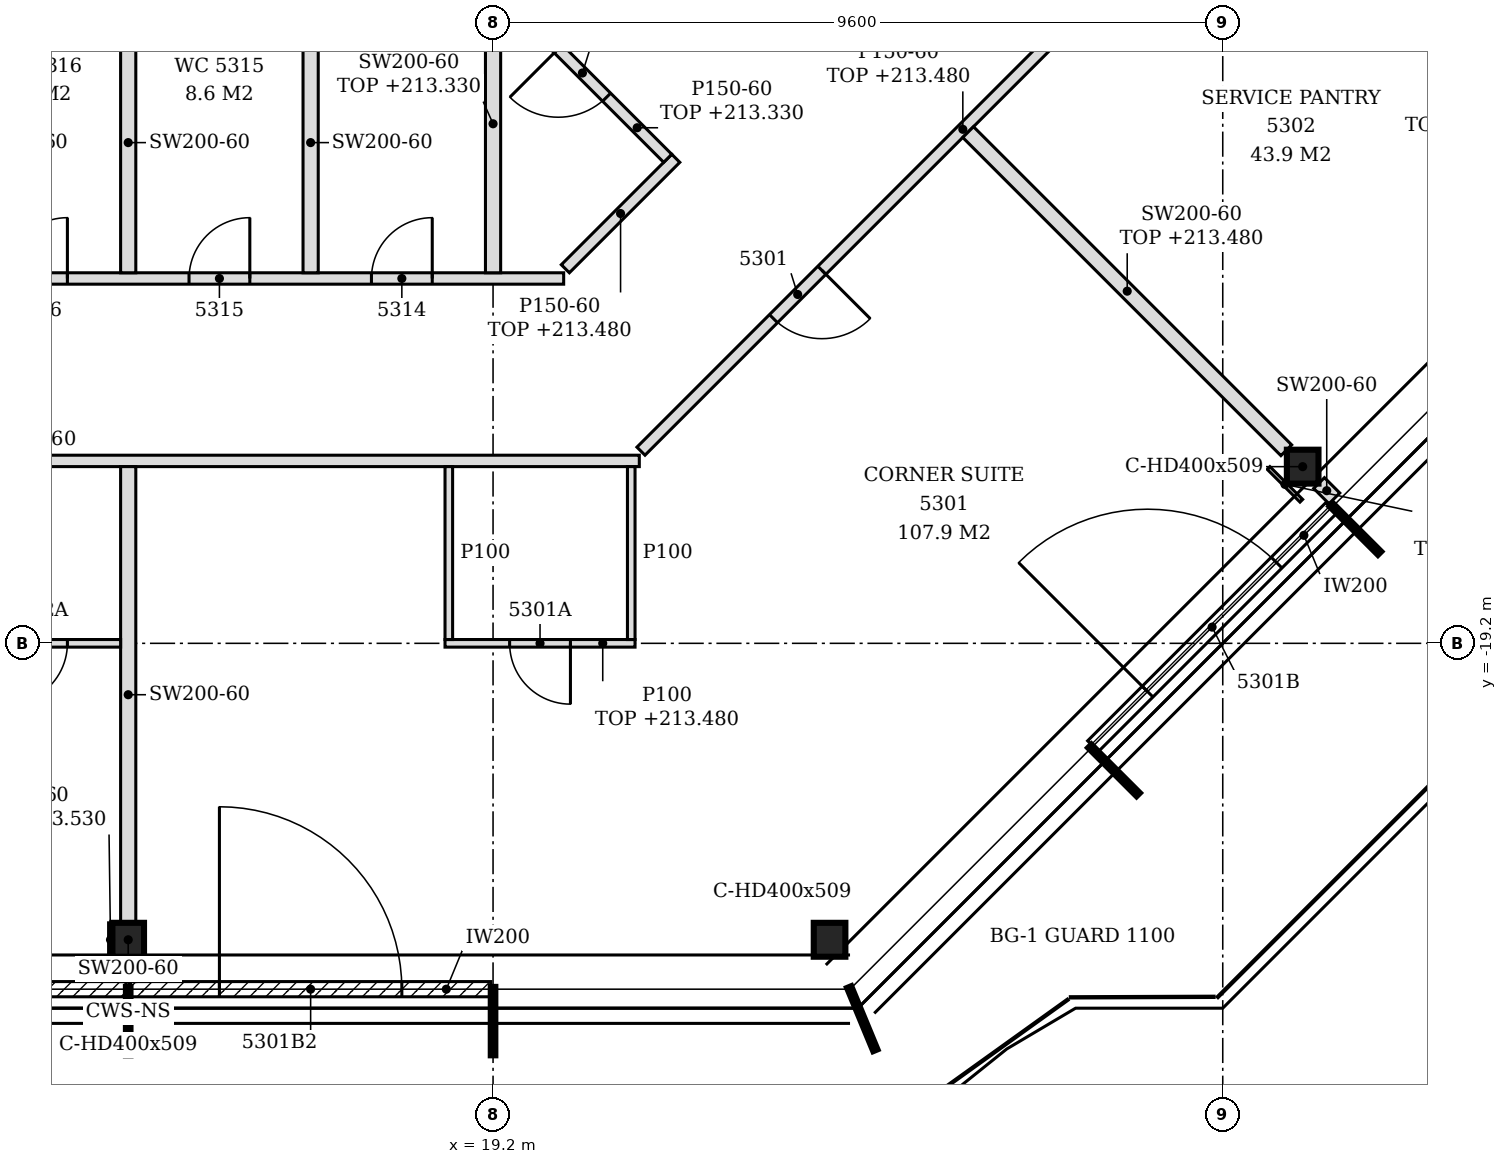
"""IFC4 building model, lengths in metres.
Left out: names, types, materials, properties, quantities, classifications, styles, units other than length and angle.
Written with IfcOpenShell. Run it as: python <this file> out.ifc"""

import sys

from ifc_helpers import new_model, si_unit, direction, frame, frame_2d, origin, origin_2d, place, context, subcontext, project, spatial, polyline, rectangle, i_section, outline, extrude, element, fill, save


model = new_model("IFC4")
c1 = context("Model", 3, precision=1e-05, world=origin(), true_north=direction((0.0, 1.0)))
c2 = subcontext(c1, "Body", "Model", "MODEL_VIEW")
j1 = project(units=[si_unit("LENGTHUNIT", "METRE"), si_unit("PLANEANGLEUNIT", "RADIAN")], contexts=[c1])
p1 = place(None, origin())
s1 = spatial("IfcSite", under=j1, at=p1, CompositionType="ELEMENT")
p2 = place(p1, origin())
s2 = spatial("IfcBuilding", under=s1, at=p2, CompositionType="ELEMENT")
p3 = place(p2, frame((0.0, 0.0, 210.6)))
s3 = spatial("IfcBuildingStorey", under=s2, at=p3, CompositionType="ELEMENT", Elevation=210.6)
for number, where, z_axis, x_axis in (
    (1, (14.4, -23.1, -0.15), (0.0, 0.0, 1.0), (1.0, 0.0, 0.0)),
    (2, (23.627, -23.1, -0.15), (0.0, 0.0, 1.0), (1.0, 0.0, 0.0)),
    (3, (29.852, -16.876, -0.15), (0.0, 0.0, 1.0), (1.0, 0.0, 0.0)),
):
    element("IfcColumn", number, at=place(p3, frame(where, z_axis=z_axis, x_axis=x_axis)), inside=s3, PredefinedType="COLUMN", context=c2, shape_type="SweptSolid", body=[
        extrude(i_section(OverallWidth=0.416, OverallDepth=0.446, WebThickness=0.039, FlangeThickness=0.063, FilletRadius=0.015, at=origin_2d()), origin(), (0.0, 0.0, 1.0), 3.6),
    ])
p4 = place(p3, frame((9.63, -23.75, 0.0), z_axis=(0.0, 0.0, 1.0), x_axis=(1.0, 0.0, 0.0)))
e4 = element("IfcWall", 4, at=p4, inside=s3, PredefinedType="NOTDEFINED", context=c2, shape_type="SweptSolid", body=[
    extrude(rectangle(XDim=4.74, YDim=0.2, at=frame_2d((2.37, 0.0))), origin(), (0.0, 0.0, 1.0), 3.45),
])
p5 = place(p4, frame((1.17, 0.0, 0.0)))
e5 = element("IfcOpeningElement", 5, at=p5, cuts=e4, PredefinedType="OPENING", context=c2, shape_type="SweptSolid", body=[
    extrude(rectangle(XDim=2.4, YDim=2.4, at=frame_2d((1.2, 1.2))), frame((0.0, 0.11, 0.0), z_axis=(0.0, -1.0, 0.0), x_axis=(1.0, 0.0, 0.0)), (0.0, 0.0, 1.0), 0.22),
])
p6 = place(p3, frame((14.43, -23.75, 0.0), z_axis=(0.0, 0.0, 1.0), x_axis=(1.0, 0.0, 0.0)))
e6 = element("IfcWall", 6, at=p6, inside=s3, PredefinedType="NOTDEFINED", context=c2, shape_type="SweptSolid", body=[
    extrude(rectangle(XDim=4.74, YDim=0.2, at=frame_2d((2.37, 0.0))), origin(), (0.0, 0.0, 1.0), 3.45),
])
p7 = place(p6, frame((1.17, 0.0, 0.0)))
e7 = element("IfcOpeningElement", 7, at=p7, cuts=e6, PredefinedType="OPENING", context=c2, shape_type="SweptSolid", body=[
    extrude(rectangle(XDim=2.4, YDim=2.4, at=frame_2d((1.2, 1.2))), frame((0.0, 0.11, 0.0), z_axis=(0.0, -1.0, 0.0), x_axis=(1.0, 0.0, 0.0)), (0.0, 0.0, 1.0), 0.22),
])
p8 = place(p3, frame((27.093, -20.553, 0.0), z_axis=(0.0, 0.0, 1.0), x_axis=(0.707079231393, 0.707134329907, 0.0)))
e8 = element("IfcWall", 8, at=p8, inside=s3, PredefinedType="NOTDEFINED", context=c2, shape_type="SweptSolid", body=[
    extrude(rectangle(XDim=4.431, YDim=0.2, at=frame_2d((2.215, 0.0))), origin(), (0.0, 0.0, 1.0), 3.45),
])
p9 = place(p8, frame((1.015, 0.0, 0.0)))
e9 = element("IfcOpeningElement", 9, at=p9, cuts=e8, PredefinedType="OPENING", context=c2, shape_type="SweptSolid", body=[
    extrude(rectangle(XDim=2.4, YDim=2.4, at=frame_2d((1.2, 1.2))), frame((0.0, 0.11, 0.0), z_axis=(0.0, -1.0, 0.0), x_axis=(1.0, 0.0, 0.0)), (0.0, 0.0, 1.0), 0.22),
])
p10 = place(p3, frame((14.4, -23.65, 0.0), z_axis=(0.0, 0.0, 1.0), x_axis=(0.0, 1.0, 0.0)))
e10 = element("IfcWall", 10, at=p10, inside=s3, PredefinedType="PARTITIONING", context=c2, shape_type="SweptSolid", body=[
    extrude(rectangle(XDim=0.327, YDim=0.2, at=frame_2d((0.164, 0.0))), origin(), (0.0, 0.0, 1.0), 3.45),
])
p11 = place(p3, frame((14.4, -22.877, 0.0), z_axis=(0.0, 0.0, 1.0), x_axis=(0.0, 1.0, 0.0)))
e11 = element("IfcWall", 11, at=p11, inside=s3, PredefinedType="PARTITIONING", context=c2, shape_type="SweptSolid", body=[
    extrude(outline(polyline([(0.0, 0.0), (6.002, 0.0), (6.002, 3.45), (3.782, 3.45), (3.78, 2.88), (3.572, 2.88), (3.57, 3.45), (0.0, 3.45), (0.0, 0.0)])), frame((0.0, 0.1, 0.0), z_axis=(0.0, -1.0, 0.0), x_axis=(1.0, 0.0, 0.0)), (0.0, 0.0, 1.0), 0.2),
])
p12 = place(p3, frame((11.95, -19.2, 0.0), z_axis=(0.0, 0.0, 1.0), x_axis=(1.0, 0.0, 0.0)))
e12 = element("IfcWall", 12, at=p12, inside=s3, PredefinedType="PARTITIONING", context=c2, shape_type="SweptSolid", body=[
    extrude(rectangle(XDim=2.35, YDim=0.1, at=frame_2d((1.175, 0.0))), origin(), (0.0, 0.0, 1.0), 2.88),
])
p13 = place(p12, frame((0.85, 0.0, 0.0)))
e13 = element("IfcOpeningElement", 13, at=p13, cuts=e12, PredefinedType="OPENING", context=c2, shape_type="SweptSolid", body=[
    extrude(rectangle(XDim=0.8, YDim=2.1, at=frame_2d((0.4, 1.05))), frame((0.0, 0.06, 0.0), z_axis=(0.0, -1.0, 0.0), x_axis=(1.0, 0.0, 0.0)), (0.0, 0.0, 1.0), 0.12),
])
p14 = place(p3, frame((18.568, -19.2, 0.0), z_axis=(0.0, 0.0, 1.0), x_axis=(1.0, 0.0, 0.0)))
e14 = element("IfcWall", 14, at=p14, inside=s3, PredefinedType="PARTITIONING", context=c2, shape_type="SweptSolid", body=[
    extrude(outline(polyline([(0.0, 0.0), (2.5, 0.0), (2.5, 2.88), (0.782, 2.88), (0.78, 2.73), (0.482, 2.73), (0.48, 2.88), (0.0, 2.88), (0.0, 0.0)])), frame((0.0, 0.05, 0.0), z_axis=(0.0, -1.0, 0.0), x_axis=(1.0, 0.0, 0.0)), (0.0, 0.0, 1.0), 0.1),
])
p15 = place(p14, frame((0.85, 0.0, 0.0)))
e15 = element("IfcOpeningElement", 15, at=p15, cuts=e14, PredefinedType="OPENING", context=c2, shape_type="SweptSolid", body=[
    extrude(rectangle(XDim=0.8, YDim=2.1, at=frame_2d((0.4, 1.05))), frame((0.0, 0.06, 0.0), z_axis=(0.0, -1.0, 0.0), x_axis=(1.0, 0.0, 0.0)), (0.0, 0.0, 1.0), 0.12),
])
p16 = place(p3, frame((18.618, -19.15, 0.0), z_axis=(0.0, 0.0, 1.0), x_axis=(0.0, 1.0, 0.0)))
e16 = element("IfcWall", 16, at=p16, inside=s3, PredefinedType="PARTITIONING", context=c2, shape_type="SweptSolid", body=[
    extrude(outline(polyline([(0.0, 0.0), (2.275, 0.0), (2.275, 3.45), (0.055, 3.45), (0.053, 2.88), (0.0, 2.88), (0.0, 0.0)])), frame((0.0, 0.05, 0.0), z_axis=(0.0, -1.0, 0.0), x_axis=(1.0, 0.0, 0.0)), (0.0, 0.0, 1.0), 0.1),
])
p17 = place(p3, frame((21.018, -19.15, 0.0), z_axis=(0.0, 0.0, 1.0), x_axis=(0.0, 1.0, 0.0)))
e17 = element("IfcWall", 17, at=p17, inside=s3, PredefinedType="PARTITIONING", context=c2, shape_type="SweptSolid", body=[
    extrude(outline(polyline([(0.0, 0.0), (2.275, 0.0), (2.275, 3.45), (0.045, 3.45), (0.043, 2.98), (0.0, 2.98), (0.0, 0.0)])), frame((0.0, 0.05, 0.0), z_axis=(0.0, -1.0, 0.0), x_axis=(1.0, 0.0, 0.0)), (0.0, 0.0, 1.0), 0.1),
])
p18 = place(p3, frame((30.269, -17.293, 0.0), z_axis=(0.0, 0.0, 1.0), x_axis=(-0.707106781187, 0.707106781187, 0.0)))
e18 = element("IfcWall", 18, at=p18, inside=s3, PredefinedType="PARTITIONING", context=c2, shape_type="SweptSolid", body=[
    extrude(rectangle(XDim=0.285, YDim=0.2, at=frame_2d((0.143, 0.0))), origin(), (0.0, 0.0, 1.0), 3.45),
])
p19 = place(p3, frame((-0.844, -16.8, 0.0), z_axis=(0.0, 0.0, 1.0), x_axis=(1.0, 0.0, 0.0)))
e19 = element("IfcWall", 19, at=p19, inside=s3, PredefinedType="PARTITIONING", context=c2, shape_type="SweptSolid", body=[
    extrude(outline(polyline([(0.0, 0.0), (21.968, 0.0), (21.968, 3.45), (20.194, 3.45), (20.191, 2.73), (19.894, 2.73), (19.892, 3.45), (8.194, 3.45), (8.191, 2.73), (7.894, 2.73), (7.892, 3.45), (0.0, 3.45), (0.0, 0.0)])), frame((0.0, 0.075, 0.0), z_axis=(0.0, -1.0, 0.0), x_axis=(1.0, 0.0, 0.0)), (0.0, 0.0, 1.0), 0.15),
])
p20 = place(p19, frame((5.194, 0.0, 0.0)))
e20 = element("IfcOpeningElement", 20, at=p20, cuts=e19, PredefinedType="OPENING", context=c2, shape_type="SweptSolid", body=[
    extrude(rectangle(XDim=0.9, YDim=2.1, at=frame_2d((0.45, 1.05))), frame((0.0, 0.085, 0.0), z_axis=(0.0, -1.0, 0.0), x_axis=(1.0, 0.0, 0.0)), (0.0, 0.0, 1.0), 0.17),
])
p21 = place(p3, frame((21.146, -16.672, 0.0), z_axis=(0.0, 0.0, 1.0), x_axis=(0.707100999376, 0.70711256295, 0.0)))
e21 = element("IfcWall", 21, at=p21, inside=s3, PredefinedType="PARTITIONING", context=c2, shape_type="SweptSolid", body=[
    extrude(rectangle(XDim=21.113, YDim=0.15, at=frame_2d((10.556, 0.0))), origin(), (0.0, 0.0, 1.0), 2.88),
])
p22 = place(p21, frame((2.466, 0.0, 0.0)))
e22 = element("IfcOpeningElement", 22, at=p22, cuts=e21, PredefinedType="OPENING", context=c2, shape_type="SweptSolid", body=[
    extrude(rectangle(XDim=0.9, YDim=2.1, at=frame_2d((0.45, 1.05))), frame((0.0, 0.085, 0.0), z_axis=(0.0, -1.0, 0.0), x_axis=(1.0, 0.0, 0.0)), (0.0, 0.0, 1.0), 0.17),
])
p23 = place(p21, frame((8.611, 0.0, 0.0)))
e23 = element("IfcOpeningElement", 23, at=p23, cuts=e21, PredefinedType="OPENING", context=c2, shape_type="SweptSolid", body=[
    extrude(rectangle(XDim=0.9, YDim=2.1, at=frame_2d((0.45, 1.05))), frame((0.0, 0.085, 0.0), z_axis=(0.0, -1.0, 0.0), x_axis=(1.0, 0.0, 0.0)), (0.0, 0.0, 1.0), 0.17),
])
p24 = place(p21, frame((13.012, 0.0, 0.0)))
e24 = element("IfcOpeningElement", 24, at=p24, cuts=e21, PredefinedType="OPENING", context=c2, shape_type="SweptSolid", body=[
    extrude(rectangle(XDim=0.9, YDim=2.1, at=frame_2d((0.45, 1.05))), frame((0.0, 0.085, 0.0), z_axis=(0.0, -1.0, 0.0), x_axis=(1.0, 0.0, 0.0)), (0.0, 0.0, 1.0), 0.17),
])
p25 = place(p21, frame((16.261, 0.0, 0.0)))
e25 = element("IfcOpeningElement", 25, at=p25, cuts=e21, PredefinedType="OPENING", context=c2, shape_type="SweptSolid", body=[
    extrude(rectangle(XDim=0.9, YDim=2.1, at=frame_2d((0.45, 1.05))), frame((0.0, 0.085, 0.0), z_axis=(0.0, -1.0, 0.0), x_axis=(1.0, 0.0, 0.0)), (0.0, 0.0, 1.0), 0.17),
])
p26 = place(p3, frame((29.636, -16.66, 0.0), z_axis=(0.0, 0.0, 1.0), x_axis=(-0.707106781187, 0.707106781187, 0.0)))
e26 = element("IfcWall", 26, at=p26, inside=s3, PredefinedType="PARTITIONING", context=c2, shape_type="SweptSolid", body=[
    extrude(rectangle(XDim=5.92, YDim=0.2, at=frame_2d((2.96, 0.0))), origin(), (0.0, 0.0, 1.0), 2.88),
])
p27 = place(p3, frame((2.325, -14.4, 0.0), z_axis=(0.0, 0.0, 1.0), x_axis=(1.0, 0.0, 0.0)))
e27 = element("IfcWall", 27, at=p27, inside=s3, PredefinedType="PARTITIONING", context=c2, shape_type="SweptSolid", body=[
    extrude(outline(polyline([(0.0, 0.0), (17.804, 0.0), (17.804, 2.88), (17.025, 2.88), (17.023, 2.73), (16.725, 2.73), (16.723, 2.88), (5.025, 2.88), (5.023, 2.73), (4.725, 2.73), (4.723, 2.88), (0.0, 2.88), (0.0, 0.0)])), frame((0.0, 0.075, 0.0), z_axis=(0.0, -1.0, 0.0), x_axis=(1.0, 0.0, 0.0)), (0.0, 0.0, 1.0), 0.15),
])
p28 = place(p27, frame((15.275, 0.0, 0.0)))
e28 = element("IfcOpeningElement", 28, at=p28, cuts=e27, PredefinedType="OPENING", context=c2, shape_type="SweptSolid", body=[
    extrude(rectangle(XDim=0.8, YDim=2.1, at=frame_2d((0.4, 1.05))), frame((0.0, 0.085, 0.0), z_axis=(0.0, -1.0, 0.0), x_axis=(1.0, 0.0, 0.0)), (0.0, 0.0, 1.0), 0.17),
])
p29 = place(p27, frame((12.875, 0.0, 0.0)))
e29 = element("IfcOpeningElement", 29, at=p29, cuts=e27, PredefinedType="OPENING", context=c2, shape_type="SweptSolid", body=[
    extrude(rectangle(XDim=0.8, YDim=2.1, at=frame_2d((0.4, 1.05))), frame((0.0, 0.085, 0.0), z_axis=(0.0, -1.0, 0.0), x_axis=(1.0, 0.0, 0.0)), (0.0, 0.0, 1.0), 0.17),
])
p30 = place(p27, frame((10.475, 0.0, 0.0)))
e30 = element("IfcOpeningElement", 30, at=p30, cuts=e27, PredefinedType="OPENING", context=c2, shape_type="SweptSolid", body=[
    extrude(rectangle(XDim=0.8, YDim=2.1, at=frame_2d((0.4, 1.05))), frame((0.0, 0.085, 0.0), z_axis=(0.0, -1.0, 0.0), x_axis=(1.0, 0.0, 0.0)), (0.0, 0.0, 1.0), 0.17),
])
for number, where, z_axis, x_axis in (
    (31, (14.4, -14.325, 0.0), (0.0, 0.0, 1.0), (0.0, 1.0, 0.0)),
    (32, (16.8, -14.325, 0.0), (0.0, 0.0, 1.0), (0.0, 1.0, 0.0)),
):
    element("IfcWall", number, at=place(p3, frame(where, z_axis=z_axis, x_axis=x_axis)), inside=s3, PredefinedType="PARTITIONING", context=c2, shape_type="SweptSolid", body=[
        extrude(outline(polyline([(0.0, 0.0), (3.425, 0.0), (3.425, 3.45), (0.03, 3.45), (0.028, 2.88), (0.0, 2.88), (0.0, 0.0)])), frame((0.0, 0.1, 0.0), z_axis=(0.0, -1.0, 0.0), x_axis=(1.0, 0.0, 0.0)), (0.0, 0.0, 1.0), 0.2),
    ])
p31 = place(p3, frame((19.2, -14.325, 0.0), z_axis=(0.0, 0.0, 1.0), x_axis=(0.0, 1.0, 0.0)))
e33 = element("IfcWall", 33, at=p31, inside=s3, PredefinedType="PARTITIONING", context=c2, shape_type="SweptSolid", body=[
    extrude(rectangle(XDim=3.92, YDim=0.2, at=frame_2d((1.96, 0.0))), origin(), (0.0, 0.0, 1.0), 2.73),
])
p32 = place(p3, frame((20.151, -14.272, 0.0), z_axis=(0.0, 0.0, 1.0), x_axis=(0.707106781187, 0.707106781187, 0.0)))
e34 = element("IfcWall", 34, at=p32, inside=s3, PredefinedType="PARTITIONING", context=c2, shape_type="SweptSolid", body=[
    extrude(rectangle(XDim=2.055, YDim=0.15, at=frame_2d((1.027, 0.0))), origin(), (0.0, 0.0, 1.0), 2.88),
])
p33 = place(p3, frame((34.581, -12.981, 0.0), z_axis=(0.0, 0.0, 1.0), x_axis=(-0.707133900936, 0.707079660397, 0.0)))
e35 = element("IfcWall", 35, at=p33, inside=s3, PredefinedType="PARTITIONING", context=c2, shape_type="SweptSolid", body=[
    extrude(rectangle(XDim=4.501, YDim=0.2, at=frame_2d((2.25, 0.0))), origin(), (0.0, 0.0, 1.0), 2.63),
])
p34 = place(p3, frame((21.498, -12.819, 0.0), z_axis=(0.0, 0.0, 1.0), x_axis=(-0.707106781187, 0.707106781187, 0.0)))
e36 = element("IfcWall", 36, at=p34, inside=s3, PredefinedType="PARTITIONING", context=c2, shape_type="SweptSolid", body=[
    extrude(rectangle(XDim=3.033, YDim=0.15, at=frame_2d((1.517, 0.0))), origin(), (0.0, 0.0, 1.0), 2.73),
])
p35 = place(p34, frame((1.137, 0.0, 0.0)))
e37 = element("IfcOpeningElement", 37, at=p35, cuts=e36, PredefinedType="OPENING", context=c2, shape_type="SweptSolid", body=[
    extrude(rectangle(XDim=0.9, YDim=2.1, at=frame_2d((0.45, 1.05))), frame((0.0, 0.085, 0.0), z_axis=(0.0, -1.0, 0.0), x_axis=(1.0, 0.0, 0.0)), (0.0, 0.0, 1.0), 0.17),
])
p36 = place(p3, frame((14.167, -23.323, 0.0), z_axis=(0.0, 0.0, 1.0), x_axis=(0.0, 1.0, 0.0)))
e38 = element("IfcWall", 38, at=p36, inside=s3, PredefinedType="PARTITIONING", context=c2, shape_type="SweptSolid", body=[
    extrude(rectangle(XDim=0.446, YDim=0.05, at=frame_2d((0.223, 0.0))), origin(), (0.0, 0.0, 1.0), 2.93),
])
p37 = place(p3, frame((29.834, -17.324, 0.0), z_axis=(0.0, 0.0, 1.0), x_axis=(-0.706906496032, 0.707307009627, 0.0)))
e39 = element("IfcWall", 39, at=p37, inside=s3, PredefinedType="PARTITIONING", context=c2, shape_type="SweptSolid", body=[
    extrude(rectangle(XDim=0.61, YDim=0.05, at=frame_2d((0.305, 0.0))), origin(), (0.0, 0.0, 1.0), 2.93),
])
p38 = place(p7, origin())
e40 = element("IfcDoor", 40, at=p38, inside=s3, OperationType="SINGLE_SWING_LEFT", PredefinedType="DOOR", context=c2, shape_type="SweptSolid", body=[
    extrude(rectangle(XDim=2.4, YDim=2.4, at=frame_2d((1.2, 1.2))), frame((0.0, 0.025, 0.0), z_axis=(0.0, -1.0, 0.0), x_axis=(1.0, 0.0, 0.0)), (0.0, 0.0, 1.0), 0.05),
])
fill(e7, e40)
p39 = place(p9, origin())
e41 = element("IfcDoor", 41, at=p39, inside=s3, OperationType="SINGLE_SWING_LEFT", PredefinedType="DOOR", context=c2, shape_type="SweptSolid", body=[
    extrude(rectangle(XDim=2.4, YDim=2.4, at=frame_2d((1.2, 1.2))), frame((0.0, 0.025, 0.0), z_axis=(0.0, -1.0, 0.0), x_axis=(1.0, 0.0, 0.0)), (0.0, 0.0, 1.0), 0.05),
])
fill(e9, e41)
p40 = place(p22, frame((0.9, 0.0, 0.0), z_axis=(0.0, 0.0, 1.0), x_axis=(-1.0, 0.0, 0.0)))
e42 = element("IfcDoor", 42, at=p40, inside=s3, OperationType="SINGLE_SWING_LEFT", PredefinedType="DOOR", context=c2, shape_type="SweptSolid", body=[
    extrude(rectangle(XDim=0.9, YDim=2.1, at=frame_2d((0.45, 1.05))), frame((0.0, 0.025, 0.0), z_axis=(0.0, -1.0, 0.0), x_axis=(1.0, 0.0, 0.0)), (0.0, 0.0, 1.0), 0.05),
])
fill(e22, e42)
p41 = place(p15, frame((0.8, 0.0, 0.0), z_axis=(0.0, 0.0, 1.0), x_axis=(-1.0, 0.0, 0.0)))
e43 = element("IfcDoor", 43, at=p41, inside=s3, OperationType="SINGLE_SWING_LEFT", PredefinedType="DOOR", context=c2, shape_type="SweptSolid", body=[
    extrude(rectangle(XDim=0.8, YDim=2.1, at=frame_2d((0.4, 1.05))), frame((0.0, 0.025, 0.0), z_axis=(0.0, -1.0, 0.0), x_axis=(1.0, 0.0, 0.0)), (0.0, 0.0, 1.0), 0.05),
])
fill(e15, e43)
p42 = place(p13, frame((0.8, 0.0, 0.0), z_axis=(0.0, 0.0, 1.0), x_axis=(-1.0, 0.0, 0.0)))
e44 = element("IfcDoor", 44, at=p42, inside=s3, OperationType="SINGLE_SWING_RIGHT", PredefinedType="DOOR", context=c2, shape_type="SweptSolid", body=[
    extrude(rectangle(XDim=0.8, YDim=2.1, at=frame_2d((0.4, 1.05))), frame((0.0, 0.025, 0.0), z_axis=(0.0, -1.0, 0.0), x_axis=(1.0, 0.0, 0.0)), (0.0, 0.0, 1.0), 0.05),
])
fill(e13, e44)
p43 = place(p28, origin())
e45 = element("IfcDoor", 45, at=p43, inside=s3, OperationType="SINGLE_SWING_RIGHT", PredefinedType="DOOR", context=c2, shape_type="SweptSolid", body=[
    extrude(rectangle(XDim=0.8, YDim=2.1, at=frame_2d((0.4, 1.05))), frame((0.0, 0.025, 0.0), z_axis=(0.0, -1.0, 0.0), x_axis=(1.0, 0.0, 0.0)), (0.0, 0.0, 1.0), 0.05),
])
fill(e28, e45)
p44 = place(p29, origin())
e46 = element("IfcDoor", 46, at=p44, inside=s3, OperationType="SINGLE_SWING_RIGHT", PredefinedType="DOOR", context=c2, shape_type="SweptSolid", body=[
    extrude(rectangle(XDim=0.8, YDim=2.1, at=frame_2d((0.4, 1.05))), frame((0.0, 0.025, 0.0), z_axis=(0.0, -1.0, 0.0), x_axis=(1.0, 0.0, 0.0)), (0.0, 0.0, 1.0), 0.05),
])
fill(e29, e46)
p45 = place(p30, origin())
e47 = element("IfcDoor", 47, at=p45, inside=s3, OperationType="SINGLE_SWING_RIGHT", PredefinedType="DOOR", context=c2, shape_type="SweptSolid", body=[
    extrude(rectangle(XDim=0.8, YDim=2.1, at=frame_2d((0.4, 1.05))), frame((0.0, 0.025, 0.0), z_axis=(0.0, -1.0, 0.0), x_axis=(1.0, 0.0, 0.0)), (0.0, 0.0, 1.0), 0.05),
])
fill(e30, e47)
p46 = place(p35, origin())
e48 = element("IfcDoor", 48, at=p46, inside=s3, OperationType="SINGLE_SWING_RIGHT", PredefinedType="DOOR", context=c2, shape_type="SweptSolid", body=[
    extrude(rectangle(XDim=0.9, YDim=2.1, at=frame_2d((0.45, 1.05))), frame((0.0, 0.025, 0.0), z_axis=(0.0, -1.0, 0.0), x_axis=(1.0, 0.0, 0.0)), (0.0, 0.0, 1.0), 0.05),
])
fill(e37, e48)
save(model, sys.argv[1])
